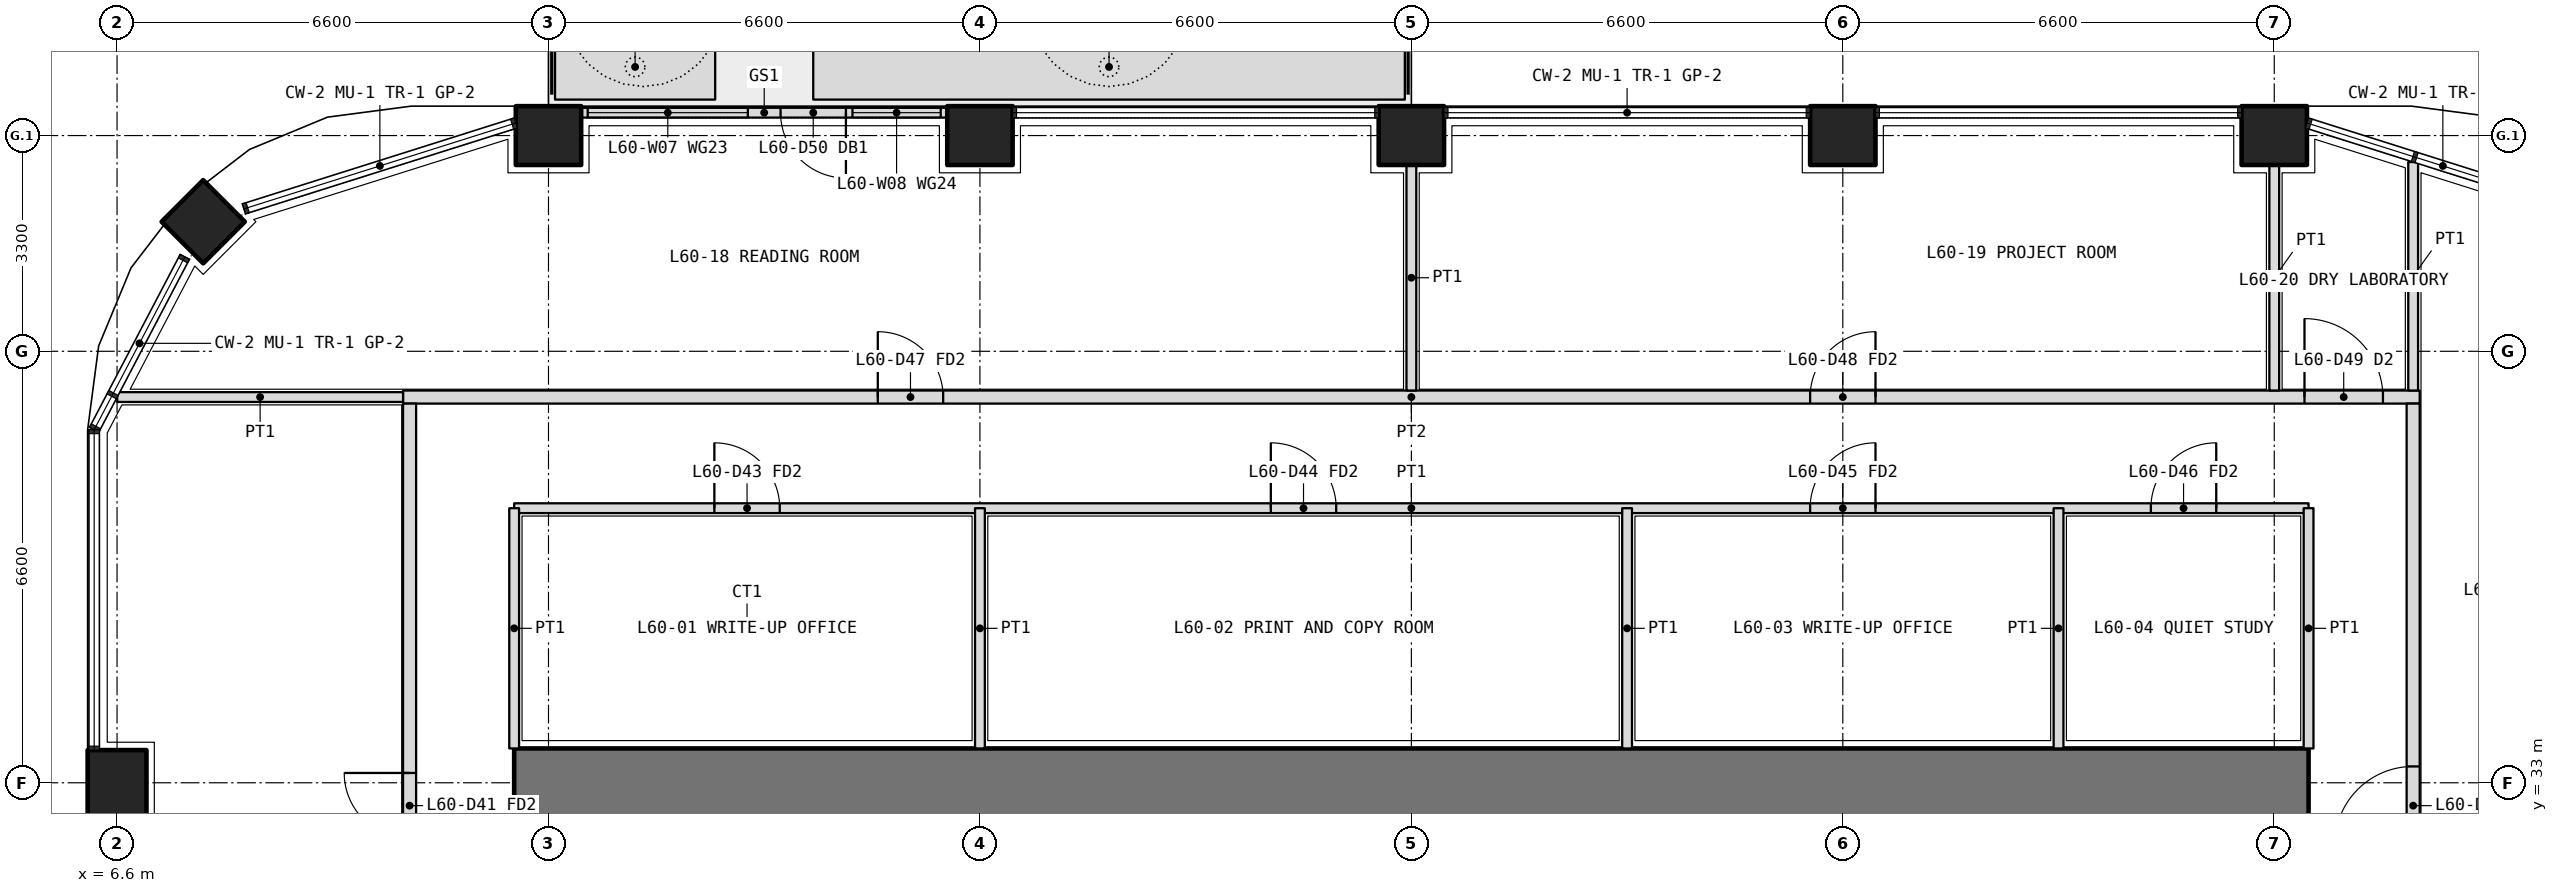
"""IFC4 building model, lengths in metres.
Left out: names, types, materials, properties, quantities, classifications, styles, units other than length and angle.
Written with IfcOpenShell. Run it as: python <this file> out.ifc"""

import sys

from ifc_helpers import new_model, si_unit, direction, frame, frame_2d, origin, origin_2d, place, context, subcontext, project, spatial, polyline, rectangle, outline, extrude, element, fill, save


model = new_model("IFC4")
c1 = context("Model", 3, precision=1e-05, world=origin(), true_north=direction((0.0, 1.0)))
c2 = subcontext(c1, "Body", "Model", "MODEL_VIEW")
j1 = project(units=[si_unit("LENGTHUNIT", "METRE"), si_unit("PLANEANGLEUNIT", "RADIAN")], contexts=[c1])
p1 = place(None, origin())
s1 = spatial("IfcSite", under=j1, at=p1, CompositionType="ELEMENT")
p2 = place(p1, origin())
s2 = spatial("IfcBuilding", under=s1, at=p2, CompositionType="ELEMENT")
p3 = place(p2, frame((0.0, 0.0, 262.8)))
s3 = spatial("IfcBuildingStorey", under=s2, at=p3, CompositionType="ELEMENT", Elevation=262.8)
p4 = place(p3, frame((7.918, 41.582, 0.0), z_axis=(0.0, 0.0, 1.0), x_axis=(0.707106781187, 0.707106781187, 0.0)))
e1 = element("IfcColumn", 1, at=p4, inside=s3, PredefinedType="COLUMN", context=c2, shape_type="SweptSolid", body=[
    extrude(rectangle(XDim=0.9, YDim=0.9, at=origin_2d()), origin(), (0.0, 0.0, 1.0), 4.2),
])
for number, where, z_axis, x_axis in (
    (2, (6.6, 33.0, 0.0), (0.0, 0.0, 1.0), (0.0, 1.0, 0.0)),
    (3, (13.2, 42.9, 0.0), (0.0, 0.0, 1.0), (1.0, 0.0, 0.0)),
    (4, (19.8, 42.9, 0.0), (0.0, 0.0, 1.0), (1.0, 0.0, 0.0)),
    (5, (26.4, 42.9, 0.0), (0.0, 0.0, 1.0), (1.0, 0.0, 0.0)),
    (6, (33.0, 42.9, 0.0), (0.0, 0.0, 1.0), (1.0, 0.0, 0.0)),
    (7, (39.6, 42.9, 0.0), (0.0, 0.0, 1.0), (1.0, 0.0, 0.0)),
):
    element("IfcColumn", number, at=place(p3, frame(where, z_axis=z_axis, x_axis=x_axis)), inside=s3, PredefinedType="COLUMN", context=c2, shape_type="SweptSolid", body=[
        extrude(rectangle(XDim=1.0, YDim=0.9, at=origin_2d()), origin(), (0.0, 0.0, 1.0), 4.2),
    ])
p5 = place(p3, origin())
e8 = element("IfcWall", 8, at=p5, inside=s3, PredefinedType="USERDEFINED", context=c2, shape_type="SweptSolid", body=[
    extrude(outline(polyline([(13.3, 43.45), (15.75, 43.45), (15.75, 44.45), (13.3, 44.45), (13.3, 43.45)]), holes=[polyline([(13.45, 43.6), (15.6, 43.6), (15.6, 44.3), (13.45, 44.3), (13.45, 43.6)])]), origin(), (0.0, 0.0, 1.0), 1.05),
])
p6 = place(p3, origin())
e9 = element("IfcWall", 9, at=p6, inside=s3, PredefinedType="USERDEFINED", context=c2, shape_type="SweptSolid", body=[
    extrude(outline(polyline([(17.25, 43.45), (26.3, 43.45), (26.3, 44.45), (17.25, 44.45), (17.25, 43.45)]), holes=[polyline([(17.4, 43.6), (26.15, 43.6), (26.15, 44.3), (17.4, 44.3), (17.4, 43.6)])]), origin(), (0.0, 0.0, 1.0), 1.05),
])
p7 = place(p3, frame((19.3, 43.25, 0.0), z_axis=(0.0, 0.0, 1.0), x_axis=(-1.0, 0.0, 0.0)))
e10 = element("IfcWall", 10, at=p7, inside=s3, PredefinedType="SOLIDWALL", context=c2, shape_type="SweptSolid", body=[
    extrude(rectangle(XDim=5.6, YDim=0.15, at=frame_2d((2.8, 0.0))), origin(), (0.0, 0.0, 1.0), 2.7),
])
p8 = place(p7, frame((1.55, 0.0, 0.0)))
e11 = element("IfcOpeningElement", 11, at=p8, cuts=e10, PredefinedType="OPENING", context=c2, shape_type="SweptSolid", body=[
    extrude(rectangle(XDim=1.0, YDim=2.4, at=frame_2d((0.5, 1.2))), frame((0.0, 0.085, 0.0), z_axis=(0.0, -1.0, 0.0), x_axis=(1.0, 0.0, 0.0)), (0.0, 0.0, 1.0), 0.17),
])
p9 = place(p7, frame((0.1, 0.0, 0.1)))
e12 = element("IfcOpeningElement", 12, at=p9, cuts=e10, PredefinedType="OPENING", context=c2, shape_type="SweptSolid", body=[
    extrude(rectangle(XDim=1.35, YDim=2.3, at=frame_2d((0.675, 1.15))), frame((0.0, 0.085, 0.0), z_axis=(0.0, -1.0, 0.0), x_axis=(1.0, 0.0, 0.0)), (0.0, 0.0, 1.0), 0.17),
])
p10 = place(p7, frame((3.05, 0.0, 0.1)))
e13 = element("IfcOpeningElement", 13, at=p10, cuts=e10, PredefinedType="OPENING", context=c2, shape_type="SweptSolid", body=[
    extrude(rectangle(XDim=2.45, YDim=2.3, at=frame_2d((1.225, 1.15))), frame((0.0, 0.085, 0.0), z_axis=(0.0, -1.0, 0.0), x_axis=(1.0, 0.0, 0.0)), (0.0, 0.0, 1.0), 0.17),
])
p11 = place(p3, frame((40.125, 33.0, 0.0), z_axis=(0.0, 0.0, 1.0), x_axis=(-1.0, 0.0, 0.0)))
e14 = element("IfcWall", 14, at=p11, inside=s3, PredefinedType="SHEAR", context=c2, shape_type="SweptSolid", body=[
    extrude(rectangle(XDim=27.45, YDim=1.05, at=frame_2d((13.725, 0.0))), origin(), (0.0, 0.0, 1.0), 4.2),
])
p12 = place(p3, frame((12.675, 37.2, 0.0), z_axis=(0.0, 0.0, 1.0), x_axis=(1.0, 0.0, 0.0)))
e15 = element("IfcWall", 15, at=p12, inside=s3, PredefinedType="PARTITIONING", context=c2, shape_type="SweptSolid", body=[
    extrude(rectangle(XDim=27.45, YDim=0.15, at=frame_2d((13.725, 0.0))), origin(), (0.0, 0.0, 1.0), 3.0),
])
p13 = place(p12, frame((3.062, 0.0, 0.0)))
e16 = element("IfcOpeningElement", 16, at=p13, cuts=e15, PredefinedType="OPENING", context=c2, shape_type="SweptSolid", body=[
    extrude(rectangle(XDim=1.0, YDim=2.1, at=frame_2d((0.5, 1.05))), frame((0.0, 0.085, 0.0), z_axis=(0.0, -1.0, 0.0), x_axis=(1.0, 0.0, 0.0)), (0.0, 0.0, 1.0), 0.17),
])
p14 = place(p12, frame((11.575, 0.0, 0.0)))
e17 = element("IfcOpeningElement", 17, at=p14, cuts=e15, PredefinedType="OPENING", context=c2, shape_type="SweptSolid", body=[
    extrude(rectangle(XDim=1.0, YDim=2.1, at=frame_2d((0.5, 1.05))), frame((0.0, 0.085, 0.0), z_axis=(0.0, -1.0, 0.0), x_axis=(1.0, 0.0, 0.0)), (0.0, 0.0, 1.0), 0.17),
])
p15 = place(p12, frame((19.825, 0.0, 0.0)))
e18 = element("IfcOpeningElement", 18, at=p15, cuts=e15, PredefinedType="OPENING", context=c2, shape_type="SweptSolid", body=[
    extrude(rectangle(XDim=1.0, YDim=2.1, at=frame_2d((0.5, 1.05))), frame((0.0, 0.085, 0.0), z_axis=(0.0, -1.0, 0.0), x_axis=(1.0, 0.0, 0.0)), (0.0, 0.0, 1.0), 0.17),
])
p16 = place(p12, frame((25.038, 0.0, 0.0)))
e19 = element("IfcOpeningElement", 19, at=p16, cuts=e15, PredefinedType="OPENING", context=c2, shape_type="SweptSolid", body=[
    extrude(rectangle(XDim=1.0, YDim=2.1, at=frame_2d((0.5, 1.05))), frame((0.0, 0.085, 0.0), z_axis=(0.0, -1.0, 0.0), x_axis=(1.0, 0.0, 0.0)), (0.0, 0.0, 1.0), 0.17),
])
for number, where, z_axis, x_axis in (
    (20, (12.675, 33.525, 0.0), (0.0, 0.0, 1.0), (0.0, 1.0, 0.0)),
    (21, (40.125, 33.525, 0.0), (0.0, 0.0, 1.0), (0.0, 1.0, 0.0)),
    (22, (19.8, 33.525, 0.0), (0.0, 0.0, 1.0), (0.0, 1.0, 0.0)),
):
    element("IfcWall", number, at=place(p3, frame(where, z_axis=z_axis, x_axis=x_axis)), inside=s3, PredefinedType="PARTITIONING", context=c2, shape_type="SweptSolid", body=[
        extrude(rectangle(XDim=3.675, YDim=0.15, at=frame_2d((1.837, 0.0))), origin(), (0.0, 0.0, 1.0), 3.0),
    ])
for number, where, z_axis, x_axis in (
    (23, (29.7, 33.525, 0.0), (0.0, 0.0, 1.0), (0.0, 1.0, 0.0)),
    (24, (36.3, 33.525, 0.0), (0.0, 0.0, 1.0), (0.0, 1.0, 0.0)),
):
    element("IfcWall", number, at=place(p3, frame(where, z_axis=z_axis, x_axis=x_axis)), inside=s3, PredefinedType="PARTITIONING", context=c2, shape_type="SweptSolid", body=[
        extrude(rectangle(XDim=3.675, YDim=0.15, at=frame_2d((1.837, 0.0))), origin(), (0.0, 0.0, 1.0), 3.9),
    ])
p17 = place(p3, frame((10.975, 38.9, 0.0), z_axis=(0.0, 0.0, 1.0), x_axis=(1.0, 0.0, 0.0)))
e25 = element("IfcWall", 25, at=p17, inside=s3, PredefinedType="PARTITIONING", context=c2, shape_type="SweptSolid", body=[
    extrude(rectangle(XDim=30.85, YDim=0.2, at=frame_2d((15.425, 0.0))), origin(), (0.0, 0.0, 1.0), 3.0),
])
p18 = place(p17, frame((7.262, 0.0, 0.0)))
e26 = element("IfcOpeningElement", 26, at=p18, cuts=e25, PredefinedType="OPENING", context=c2, shape_type="SweptSolid", body=[
    extrude(rectangle(XDim=1.0, YDim=2.1, at=frame_2d((0.5, 1.05))), frame((0.0, 0.11, 0.0), z_axis=(0.0, -1.0, 0.0), x_axis=(1.0, 0.0, 0.0)), (0.0, 0.0, 1.0), 0.22),
])
p19 = place(p17, frame((21.525, 0.0, 0.0)))
e27 = element("IfcOpeningElement", 27, at=p19, cuts=e25, PredefinedType="OPENING", context=c2, shape_type="SweptSolid", body=[
    extrude(rectangle(XDim=1.0, YDim=2.1, at=frame_2d((0.5, 1.05))), frame((0.0, 0.11, 0.0), z_axis=(0.0, -1.0, 0.0), x_axis=(1.0, 0.0, 0.0)), (0.0, 0.0, 1.0), 0.22),
])
p20 = place(p17, frame((29.087, 0.0, 0.0)))
e28 = element("IfcOpeningElement", 28, at=p20, cuts=e25, PredefinedType="OPENING", context=c2, shape_type="SweptSolid", body=[
    extrude(rectangle(XDim=1.2, YDim=2.1, at=frame_2d((0.6, 1.05))), frame((0.0, 0.11, 0.0), z_axis=(0.0, -1.0, 0.0), x_axis=(1.0, 0.0, 0.0)), (0.0, 0.0, 1.0), 0.22),
])
p21 = place(p3, frame((11.075, 7.4, 0.0), z_axis=(0.0, 0.0, 1.0), x_axis=(0.0, 1.0, 0.0)))
e29 = element("IfcWall", 29, at=p21, inside=s3, PredefinedType="PARTITIONING", context=c2, shape_type="SweptSolid", body=[
    extrude(rectangle(XDim=31.4, YDim=0.2, at=frame_2d((15.7, 0.0))), origin(), (0.0, 0.0, 1.0), 3.0),
])
p22 = place(p21, frame((2.25, 0.0, 0.0)))
e30 = element("IfcOpeningElement", 30, at=p22, cuts=e29, PredefinedType="OPENING", context=c2, shape_type="SweptSolid", body=[
    extrude(rectangle(XDim=1.2, YDim=2.1, at=frame_2d((0.6, 1.05))), frame((0.0, 0.11, 0.0), z_axis=(0.0, -1.0, 0.0), x_axis=(1.0, 0.0, 0.0)), (0.0, 0.0, 1.0), 0.22),
])
p23 = place(p21, frame((6.9, 0.0, 0.0)))
e31 = element("IfcOpeningElement", 31, at=p23, cuts=e29, PredefinedType="OPENING", context=c2, shape_type="SweptSolid", body=[
    extrude(rectangle(XDim=1.0, YDim=2.1, at=frame_2d((0.5, 1.05))), frame((0.0, 0.11, 0.0), z_axis=(0.0, -1.0, 0.0), x_axis=(1.0, 0.0, 0.0)), (0.0, 0.0, 1.0), 0.22),
])
p24 = place(p21, frame((10.35, 0.0, 0.0)))
e32 = element("IfcOpeningElement", 32, at=p24, cuts=e29, PredefinedType="OPENING", context=c2, shape_type="SweptSolid", body=[
    extrude(rectangle(XDim=0.9, YDim=2.1, at=frame_2d((0.45, 1.05))), frame((0.0, 0.11, 0.0), z_axis=(0.0, -1.0, 0.0), x_axis=(1.0, 0.0, 0.0)), (0.0, 0.0, 1.0), 0.22),
])
p25 = place(p21, frame((13.7, 0.0, 0.0)))
e33 = element("IfcOpeningElement", 33, at=p25, cuts=e29, PredefinedType="OPENING", context=c2, shape_type="SweptSolid", body=[
    extrude(rectangle(XDim=0.9, YDim=2.1, at=frame_2d((0.45, 1.05))), frame((0.0, 0.11, 0.0), z_axis=(0.0, -1.0, 0.0), x_axis=(1.0, 0.0, 0.0)), (0.0, 0.0, 1.0), 0.22),
])
p26 = place(p21, frame((16.85, 0.0, 0.0)))
e34 = element("IfcOpeningElement", 34, at=p26, cuts=e29, PredefinedType="OPENING", context=c2, shape_type="SweptSolid", body=[
    extrude(rectangle(XDim=1.0, YDim=2.1, at=frame_2d((0.5, 1.05))), frame((0.0, 0.11, 0.0), z_axis=(0.0, -1.0, 0.0), x_axis=(1.0, 0.0, 0.0)), (0.0, 0.0, 1.0), 0.22),
])
p27 = place(p21, frame((24.75, 0.0, 0.0)))
e35 = element("IfcOpeningElement", 35, at=p27, cuts=e29, PredefinedType="OPENING", context=c2, shape_type="SweptSolid", body=[
    extrude(rectangle(XDim=1.0, YDim=2.1, at=frame_2d((0.5, 1.05))), frame((0.0, 0.11, 0.0), z_axis=(0.0, -1.0, 0.0), x_axis=(1.0, 0.0, 0.0)), (0.0, 0.0, 1.0), 0.22),
])
p28 = place(p3, frame((41.725, 7.4, 0.0), z_axis=(0.0, 0.0, 1.0), x_axis=(0.0, 1.0, 0.0)))
e36 = element("IfcWall", 36, at=p28, inside=s3, PredefinedType="PARTITIONING", context=c2, shape_type="SweptSolid", body=[
    extrude(rectangle(XDim=31.4, YDim=0.2, at=frame_2d((15.7, 0.0))), origin(), (0.0, 0.0, 1.0), 3.0),
])
p29 = place(p28, frame((5.65, 0.0, 0.0)))
e37 = element("IfcOpeningElement", 37, at=p29, cuts=e36, PredefinedType="OPENING", context=c2, shape_type="SweptSolid", body=[
    extrude(rectangle(XDim=1.0, YDim=2.1, at=frame_2d((0.5, 1.05))), frame((0.0, 0.11, 0.0), z_axis=(0.0, -1.0, 0.0), x_axis=(1.0, 0.0, 0.0)), (0.0, 0.0, 1.0), 0.22),
])
p30 = place(p28, frame((13.4, 0.0, 0.0)))
e38 = element("IfcOpeningElement", 38, at=p30, cuts=e36, PredefinedType="OPENING", context=c2, shape_type="SweptSolid", body=[
    extrude(rectangle(XDim=1.0, YDim=2.1, at=frame_2d((0.5, 1.05))), frame((0.0, 0.11, 0.0), z_axis=(0.0, -1.0, 0.0), x_axis=(1.0, 0.0, 0.0)), (0.0, 0.0, 1.0), 0.22),
])
p31 = place(p28, frame((16.75, 0.0, 0.0)))
e39 = element("IfcOpeningElement", 39, at=p31, cuts=e36, PredefinedType="OPENING", context=c2, shape_type="SweptSolid", body=[
    extrude(rectangle(XDim=0.9, YDim=2.1, at=frame_2d((0.45, 1.05))), frame((0.0, 0.11, 0.0), z_axis=(0.0, -1.0, 0.0), x_axis=(1.0, 0.0, 0.0)), (0.0, 0.0, 1.0), 0.22),
])
p32 = place(p28, frame((24.65, 0.0, 0.0)))
e40 = element("IfcOpeningElement", 40, at=p32, cuts=e36, PredefinedType="OPENING", context=c2, shape_type="SweptSolid", body=[
    extrude(rectangle(XDim=1.2, YDim=2.1, at=frame_2d((0.6, 1.05))), frame((0.0, 0.11, 0.0), z_axis=(0.0, -1.0, 0.0), x_axis=(1.0, 0.0, 0.0)), (0.0, 0.0, 1.0), 0.22),
])
p33 = place(p3, frame((41.725, 42.495, 0.0), z_axis=(0.0, 0.0, 1.0), x_axis=(0.0, -1.0, 0.0)))
e41 = element("IfcWall", 41, at=p33, inside=s3, PredefinedType="PARTITIONING", context=c2, shape_type="SweptSolid", body=[
    extrude(rectangle(XDim=3.495, YDim=0.15, at=frame_2d((1.748, 0.0))), origin(), (0.0, 0.0, 1.0), 2.7),
])
p34 = place(p3, frame((6.603, 38.9, 0.0), z_axis=(0.0, 0.0, 1.0), x_axis=(1.0, 0.0, 0.0)))
e42 = element("IfcWall", 42, at=p34, inside=s3, PredefinedType="PARTITIONING", context=c2, shape_type="SweptSolid", body=[
    extrude(rectangle(XDim=4.373, YDim=0.15, at=frame_2d((2.186, 0.0))), origin(), (0.0, 0.0, 1.0), 2.7),
])
for number, where, z_axis, x_axis in (
    (43, (26.4, 42.45, 0.0), (0.0, 0.0, 1.0), (0.0, -1.0, 0.0)),
    (44, (39.6, 42.45, 0.0), (0.0, 0.0, 1.0), (0.0, -1.0, 0.0)),
):
    element("IfcWall", number, at=place(p3, frame(where, z_axis=z_axis, x_axis=x_axis)), inside=s3, PredefinedType="PARTITIONING", context=c2, shape_type="SweptSolid", body=[
        extrude(rectangle(XDim=3.45, YDim=0.15, at=frame_2d((1.725, 0.0))), origin(), (0.0, 0.0, 1.0), 3.0),
    ])
p35 = place(p8, origin())
e45 = element("IfcDoor", 45, at=p35, inside=s3, OperationType="SINGLE_SWING_LEFT", PredefinedType="DOOR", context=c2, shape_type="SweptSolid", body=[
    extrude(rectangle(XDim=1.0, YDim=2.4, at=frame_2d((0.5, 1.2))), frame((0.0, 0.025, 0.0), z_axis=(0.0, -1.0, 0.0), x_axis=(1.0, 0.0, 0.0)), (0.0, 0.0, 1.0), 0.05),
])
fill(e11, e45)
p36 = place(p9, origin())
e46 = element("IfcWindow", 46, at=p36, inside=s3, PartitioningType="SINGLE_PANEL", PredefinedType="WINDOW", context=c2, shape_type="SweptSolid", body=[
    extrude(rectangle(XDim=1.35, YDim=2.3, at=frame_2d((0.675, 1.15))), frame((0.0, 0.03, 0.0), z_axis=(0.0, -1.0, 0.0), x_axis=(1.0, 0.0, 0.0)), (0.0, 0.0, 1.0), 0.06),
])
fill(e12, e46)
p37 = place(p10, origin())
e47 = element("IfcWindow", 47, at=p37, inside=s3, PartitioningType="SINGLE_PANEL", PredefinedType="WINDOW", context=c2, shape_type="SweptSolid", body=[
    extrude(rectangle(XDim=2.45, YDim=2.3, at=frame_2d((1.225, 1.15))), frame((0.0, 0.03, 0.0), z_axis=(0.0, -1.0, 0.0), x_axis=(1.0, 0.0, 0.0)), (0.0, 0.0, 1.0), 0.06),
])
fill(e13, e47)
p38 = place(p13, origin())
e48 = element("IfcDoor", 48, at=p38, inside=s3, OperationType="SINGLE_SWING_LEFT", PredefinedType="DOOR", context=c2, shape_type="SweptSolid", body=[
    extrude(rectangle(XDim=1.0, YDim=2.1, at=frame_2d((0.5, 1.05))), frame((0.0, 0.025, 0.0), z_axis=(0.0, -1.0, 0.0), x_axis=(1.0, 0.0, 0.0)), (0.0, 0.0, 1.0), 0.05),
])
fill(e16, e48)
p39 = place(p14, origin())
e49 = element("IfcDoor", 49, at=p39, inside=s3, OperationType="SINGLE_SWING_LEFT", PredefinedType="DOOR", context=c2, shape_type="SweptSolid", body=[
    extrude(rectangle(XDim=1.0, YDim=2.1, at=frame_2d((0.5, 1.05))), frame((0.0, 0.025, 0.0), z_axis=(0.0, -1.0, 0.0), x_axis=(1.0, 0.0, 0.0)), (0.0, 0.0, 1.0), 0.05),
])
fill(e17, e49)
p40 = place(p15, origin())
e50 = element("IfcDoor", 50, at=p40, inside=s3, OperationType="SINGLE_SWING_RIGHT", PredefinedType="DOOR", context=c2, shape_type="SweptSolid", body=[
    extrude(rectangle(XDim=1.0, YDim=2.1, at=frame_2d((0.5, 1.05))), frame((0.0, 0.025, 0.0), z_axis=(0.0, -1.0, 0.0), x_axis=(1.0, 0.0, 0.0)), (0.0, 0.0, 1.0), 0.05),
])
fill(e18, e50)
p41 = place(p16, origin())
e51 = element("IfcDoor", 51, at=p41, inside=s3, OperationType="SINGLE_SWING_RIGHT", PredefinedType="DOOR", context=c2, shape_type="SweptSolid", body=[
    extrude(rectangle(XDim=1.0, YDim=2.1, at=frame_2d((0.5, 1.05))), frame((0.0, 0.025, 0.0), z_axis=(0.0, -1.0, 0.0), x_axis=(1.0, 0.0, 0.0)), (0.0, 0.0, 1.0), 0.05),
])
fill(e19, e51)
p42 = place(p32, origin())
e52 = element("IfcDoor", 52, at=p42, inside=s3, OperationType="DOUBLE_DOOR_SINGLE_SWING", PredefinedType="DOOR", context=c2, shape_type="SweptSolid", body=[
    extrude(rectangle(XDim=1.2, YDim=2.1, at=frame_2d((0.6, 1.05))), frame((0.0, 0.025, 0.0), z_axis=(0.0, -1.0, 0.0), x_axis=(1.0, 0.0, 0.0)), (0.0, 0.0, 1.0), 0.05),
])
fill(e40, e52)
p43 = place(p18, origin())
e53 = element("IfcDoor", 53, at=p43, inside=s3, OperationType="SINGLE_SWING_LEFT", PredefinedType="DOOR", context=c2, shape_type="SweptSolid", body=[
    extrude(rectangle(XDim=1.0, YDim=2.1, at=frame_2d((0.5, 1.05))), frame((0.0, 0.025, 0.0), z_axis=(0.0, -1.0, 0.0), x_axis=(1.0, 0.0, 0.0)), (0.0, 0.0, 1.0), 0.05),
])
fill(e26, e53)
p44 = place(p19, origin())
e54 = element("IfcDoor", 54, at=p44, inside=s3, OperationType="SINGLE_SWING_RIGHT", PredefinedType="DOOR", context=c2, shape_type="SweptSolid", body=[
    extrude(rectangle(XDim=1.0, YDim=2.1, at=frame_2d((0.5, 1.05))), frame((0.0, 0.025, 0.0), z_axis=(0.0, -1.0, 0.0), x_axis=(1.0, 0.0, 0.0)), (0.0, 0.0, 1.0), 0.05),
])
fill(e27, e54)
p45 = place(p20, origin())
e55 = element("IfcDoor", 55, at=p45, inside=s3, OperationType="DOUBLE_DOOR_SINGLE_SWING", PredefinedType="DOOR", context=c2, shape_type="SweptSolid", body=[
    extrude(rectangle(XDim=1.2, YDim=2.1, at=frame_2d((0.6, 1.05))), frame((0.0, 0.025, 0.0), z_axis=(0.0, -1.0, 0.0), x_axis=(1.0, 0.0, 0.0)), (0.0, 0.0, 1.0), 0.05),
])
fill(e28, e55)
p46 = place(p27, origin())
e56 = element("IfcDoor", 56, at=p46, inside=s3, OperationType="SINGLE_SWING_RIGHT", PredefinedType="DOOR", context=c2, shape_type="SweptSolid", body=[
    extrude(rectangle(XDim=1.0, YDim=2.1, at=frame_2d((0.5, 1.05))), frame((0.0, 0.025, 0.0), z_axis=(0.0, -1.0, 0.0), x_axis=(1.0, 0.0, 0.0)), (0.0, 0.0, 1.0), 0.05),
])
fill(e35, e56)
save(model, sys.argv[1])
